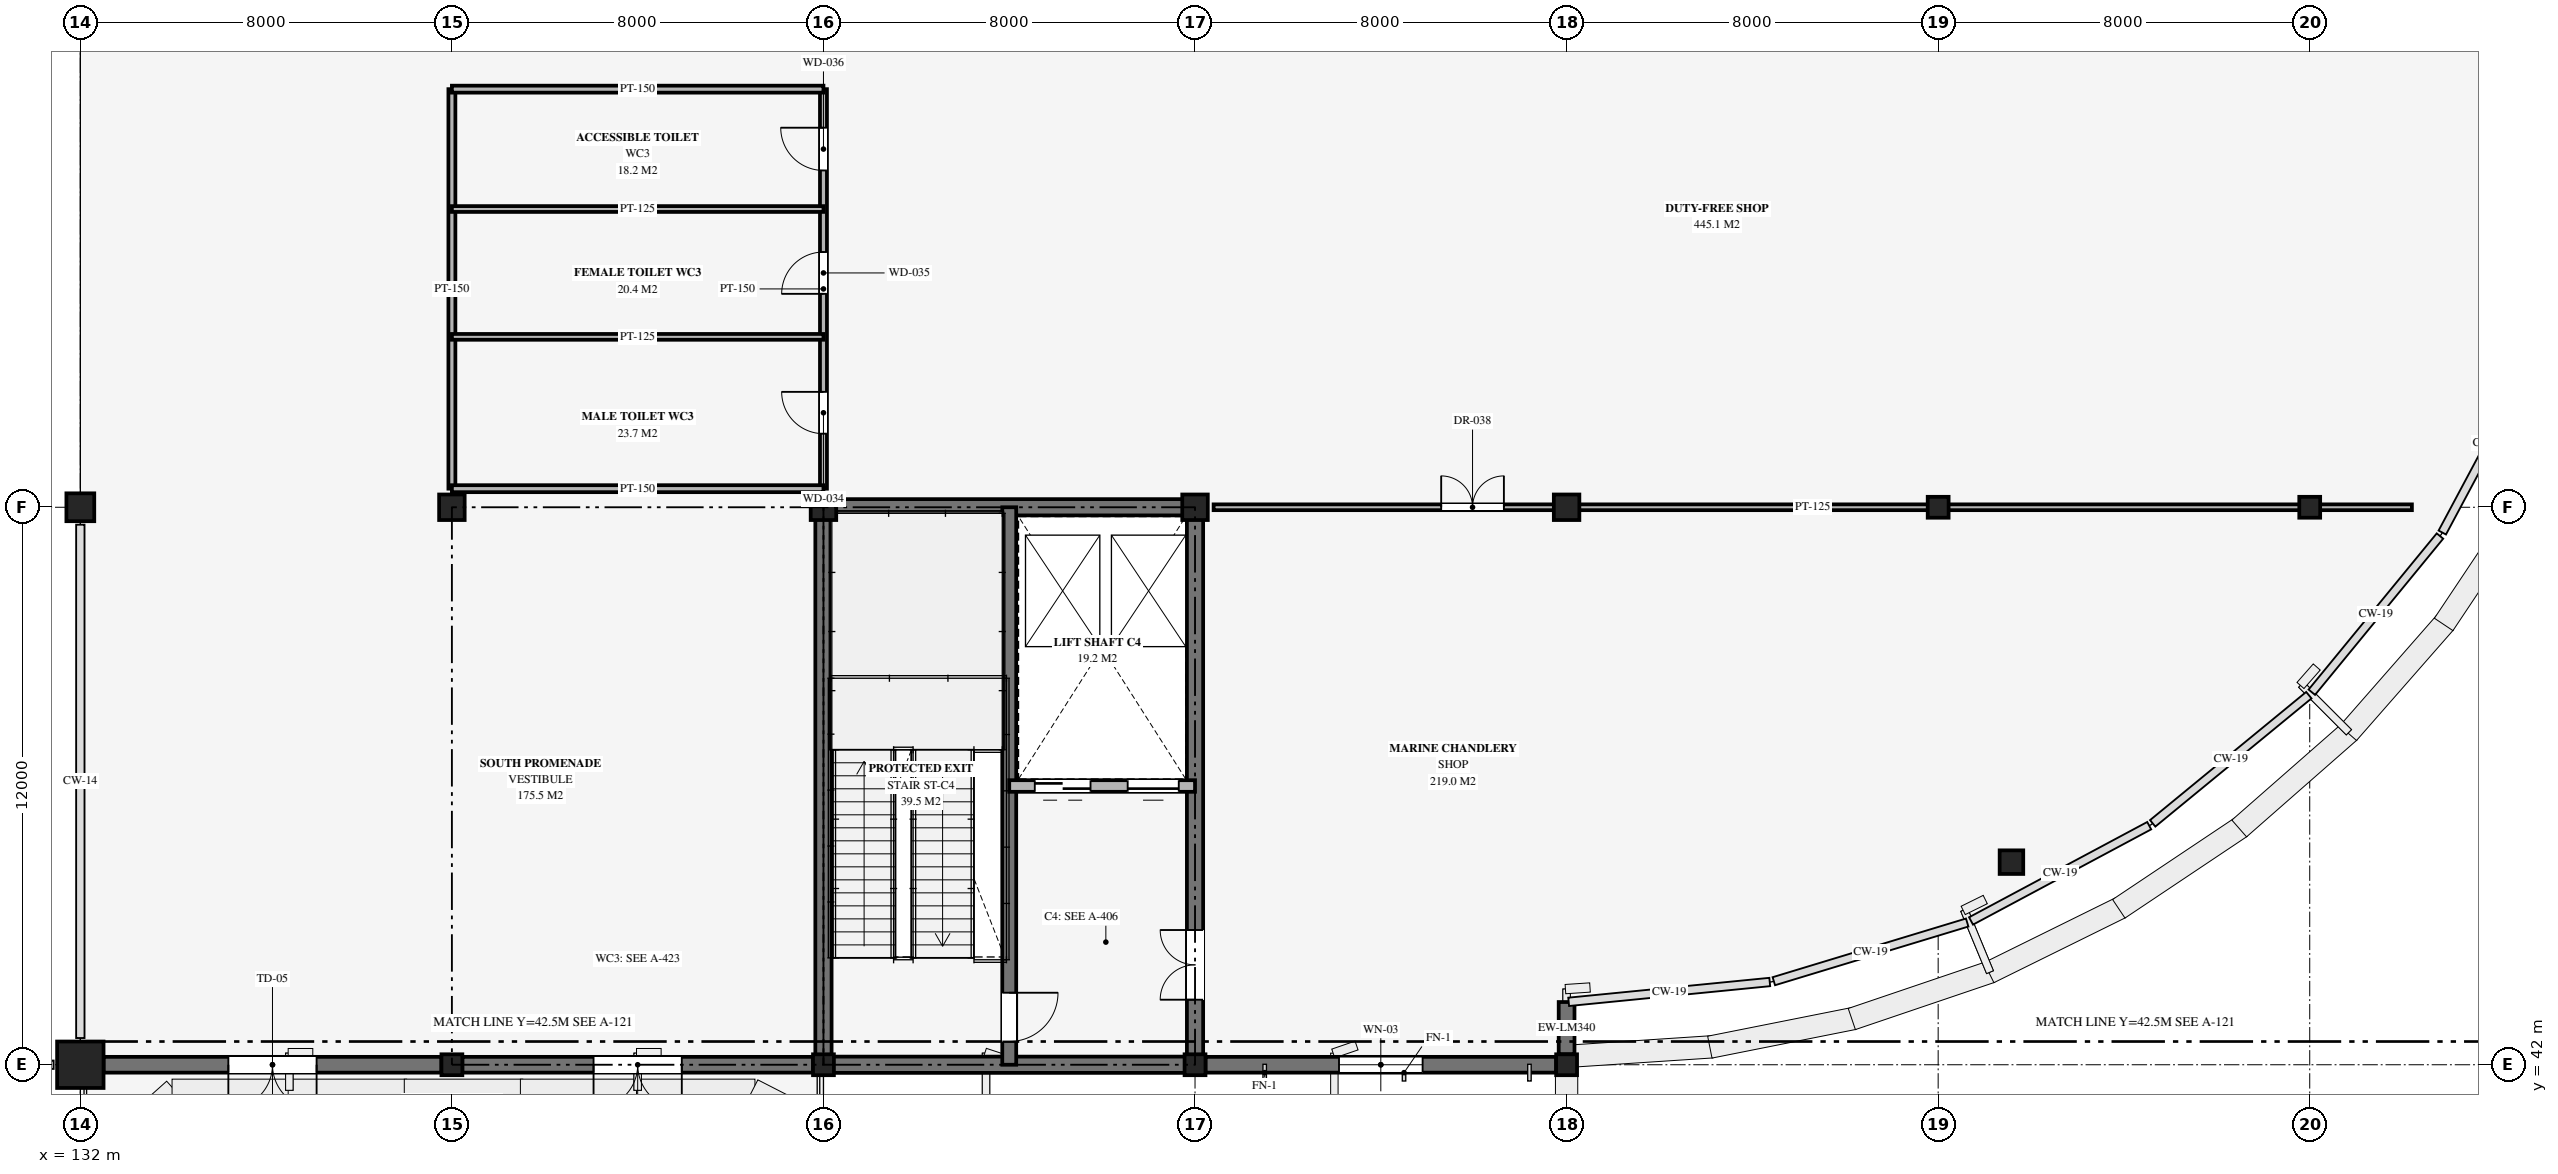
"""IFC4 building model, lengths in metres.
Left out: names, types, materials, properties, quantities, classifications, styles, units other than length and angle.
Written with IfcOpenShell. Run it as: python <this file> out.ifc"""

import sys

from ifc_helpers import new_model, si_unit, direction, frame, frame_2d, origin, origin_2d, place, context, subcontext, project, spatial, rectangle, circle, hollow_circle, extrude, element, fill, save


model = new_model("IFC4")
c1 = context("Model", 3, precision=1e-05, world=origin(), true_north=direction((0.0, 1.0)))
c2 = subcontext(c1, "Body", "Model", "MODEL_VIEW")
j1 = project(units=[si_unit("LENGTHUNIT", "METRE"), si_unit("PLANEANGLEUNIT", "RADIAN")], contexts=[c1])
p1 = place(None, origin())
s1 = spatial("IfcSite", under=j1, at=p1, CompositionType="ELEMENT")
p2 = place(p1, origin())
s2 = spatial("IfcBuilding", under=s1, at=p2, CompositionType="ELEMENT")
p3 = place(p2, frame((0.0, 0.0, 10.2)))
s3 = spatial("IfcBuildingStorey", under=s2, at=p3, CompositionType="ELEMENT", Elevation=10.2)
p4 = place(p3, frame((132.0, 42.0, 0.0), z_axis=(0.0, 0.0, 1.0), x_axis=(1.0, 0.0, 0.0)))
e1 = element("IfcColumn", 1, at=p4, inside=s3, PredefinedType="COLUMN", context=c2, shape_type="SweptSolid", body=[
    extrude(rectangle(XDim=1.0, YDim=1.0, at=origin_2d()), origin(), (0.0, 0.0, 1.0), 4.8),
])
p5 = place(p3, frame((132.0, 54.0, 0.0), z_axis=(0.0, 0.0, 1.0), x_axis=(1.0, 0.0, 0.0)))
e2 = element("IfcColumn", 2, at=p5, inside=s3, PredefinedType="COLUMN", context=c2, shape_type="SweptSolid", body=[
    extrude(circle(Radius=0.3, at=origin_2d()), origin(), (0.0, 0.0, 1.0), 4.64),
])
p6 = place(p3, frame((140.0, 42.0, 0.0), z_axis=(0.0, 0.0, 1.0), x_axis=(1.0, 0.0, 0.0)))
e3 = element("IfcColumn", 3, at=p6, inside=s3, PredefinedType="COLUMN", context=c2, shape_type="SweptSolid", body=[
    extrude(rectangle(XDim=0.45, YDim=0.45, at=origin_2d()), origin(), (0.0, 0.0, 1.0), 4.64),
])
p7 = place(p3, frame((140.0, 54.0, 0.0), z_axis=(0.0, 0.0, 1.0), x_axis=(1.0, 0.0, 0.0)))
e4 = element("IfcColumn", 4, at=p7, inside=s3, PredefinedType="COLUMN", context=c2, shape_type="SweptSolid", body=[
    extrude(rectangle(XDim=0.55, YDim=0.55, at=origin_2d()), origin(), (0.0, 0.0, 1.0), 4.64),
])
p8 = place(p3, frame((148.0, 42.0, 0.0), z_axis=(0.0, 0.0, 1.0), x_axis=(1.0, 0.0, 0.0)))
e5 = element("IfcColumn", 5, at=p8, inside=s3, PredefinedType="COLUMN", context=c2, shape_type="SweptSolid", body=[
    extrude(rectangle(XDim=0.45, YDim=0.45, at=origin_2d()), origin(), (0.0, 0.0, 1.0), 4.64),
])
p9 = place(p3, frame((148.0, 54.0, 0.0), z_axis=(0.0, 0.0, 1.0), x_axis=(1.0, 0.0, 0.0)))
e6 = element("IfcColumn", 6, at=p9, inside=s3, PredefinedType="COLUMN", context=c2, shape_type="SweptSolid", body=[
    extrude(rectangle(XDim=0.55, YDim=0.55, at=origin_2d()), origin(), (0.0, 0.0, 1.0), 4.64),
])
p10 = place(p3, frame((156.0, 42.0, 0.0), z_axis=(0.0, 0.0, 1.0), x_axis=(1.0, 0.0, 0.0)))
e7 = element("IfcColumn", 7, at=p10, inside=s3, PredefinedType="COLUMN", context=c2, shape_type="SweptSolid", body=[
    extrude(rectangle(XDim=0.45, YDim=0.45, at=origin_2d()), origin(), (0.0, 0.0, 1.0), 4.64),
])
p11 = place(p3, frame((156.0, 54.0, 0.0), z_axis=(0.0, 0.0, 1.0), x_axis=(1.0, 0.0, 0.0)))
e8 = element("IfcColumn", 8, at=p11, inside=s3, PredefinedType="COLUMN", context=c2, shape_type="SweptSolid", body=[
    extrude(rectangle(XDim=0.55, YDim=0.55, at=origin_2d()), origin(), (0.0, 0.0, 1.0), 4.64),
])
p12 = place(p3, frame((164.0, 42.0, 0.0), z_axis=(0.0, 0.0, 1.0), x_axis=(1.0, 0.0, 0.0)))
e9 = element("IfcColumn", 9, at=p12, inside=s3, PredefinedType="COLUMN", context=c2, shape_type="SweptSolid", body=[
    extrude(rectangle(XDim=0.45, YDim=0.45, at=origin_2d()), origin(), (0.0, 0.0, 1.0), 4.64),
])
p13 = place(p3, frame((164.0, 54.0, 0.0), z_axis=(0.0, 0.0, 1.0), x_axis=(1.0, 0.0, 0.0)))
e10 = element("IfcColumn", 10, at=p13, inside=s3, PredefinedType="COLUMN", context=c2, shape_type="SweptSolid", body=[
    extrude(rectangle(XDim=0.55, YDim=0.55, at=origin_2d()), origin(), (0.0, 0.0, 1.0), 4.64),
])
for number, where, z_axis, x_axis in (
    (11, (172.0, 54.0, 0.0), (0.0, 0.0, 1.0), (1.0, 0.0, 0.0)),
    (12, (180.0, 54.0, 0.0), (0.0, 0.0, 1.0), (1.0, 0.0, 0.0)),
):
    element("IfcColumn", number, at=place(p3, frame(where, z_axis=z_axis, x_axis=x_axis)), inside=s3, PredefinedType="COLUMN", context=c2, shape_type="SweptSolid", body=[
        extrude(rectangle(XDim=0.45, YDim=0.45, at=origin_2d()), origin(), (0.0, 0.0, 1.0), 4.64),
    ])
p14 = place(p3, frame((173.578, 46.361, 0.0), z_axis=(0.0, 0.0, 1.0), x_axis=(1.0, 0.0, 0.0)))
e13 = element("IfcColumn", 13, at=p14, inside=s3, PredefinedType="COLUMN", context=c2, shape_type="SweptSolid", body=[
    extrude(hollow_circle(Radius=0.254, WallThickness=0.02, at=origin_2d()), origin(), (0.0, 0.0, 1.0), 4.64),
])
p15 = place(p3, frame((164.0, 42.225, 0.0), z_axis=(0.0, 0.0, 1.0), x_axis=(0.0, 1.0, 0.0)))
e14 = element("IfcWall", 14, at=p15, inside=s3, PredefinedType="SOLIDWALL", context=c2, shape_type="SweptSolid", body=[
    extrude(rectangle(XDim=1.125, YDim=0.34, at=frame_2d((0.562, 0.0))), origin(), (0.0, 0.0, 1.0), 4.52),
])
p16 = place(p3, frame((139.775, 42.0, 0.0), z_axis=(0.0, 0.0, 1.0), x_axis=(-1.0, 0.0, 0.0)))
e15 = element("IfcWall", 15, at=p16, inside=s3, PredefinedType="SOLIDWALL", context=c2, shape_type="SweptSolid", body=[
    extrude(rectangle(XDim=7.275, YDim=0.34, at=frame_2d((3.637, 0.0))), origin(), (0.0, 0.0, 1.0), 4.52),
])
p17 = place(p16, frame((2.688, 0.0, 0.0)))
e16 = element("IfcOpeningElement", 16, at=p17, cuts=e15, PredefinedType="OPENING", context=c2, shape_type="SweptSolid", body=[
    extrude(rectangle(XDim=1.9, YDim=2.2, at=frame_2d((0.95, 1.1))), frame((0.0, 0.18, 0.0), z_axis=(0.0, -1.0, 0.0), x_axis=(1.0, 0.0, 0.0)), (0.0, 0.0, 1.0), 0.36),
])
p18 = place(p3, frame((147.775, 42.0, 0.0), z_axis=(0.0, 0.0, 1.0), x_axis=(-1.0, 0.0, 0.0)))
e17 = element("IfcWall", 17, at=p18, inside=s3, PredefinedType="SOLIDWALL", context=c2, shape_type="SweptSolid", body=[
    extrude(rectangle(XDim=7.55, YDim=0.34, at=frame_2d((3.775, 0.0))), origin(), (0.0, 0.0, 1.0), 4.52),
])
p19 = place(p18, frame((2.825, 0.0, 0.0)))
e18 = element("IfcOpeningElement", 18, at=p19, cuts=e17, PredefinedType="OPENING", context=c2, shape_type="SweptSolid", body=[
    extrude(rectangle(XDim=1.9, YDim=2.2, at=frame_2d((0.95, 1.1))), frame((0.0, 0.18, 0.0), z_axis=(0.0, -1.0, 0.0), x_axis=(1.0, 0.0, 0.0)), (0.0, 0.0, 1.0), 0.36),
])
p20 = place(p3, frame((163.775, 42.0, 0.0), z_axis=(0.0, 0.0, 1.0), x_axis=(-1.0, 0.0, 0.0)))
e19 = element("IfcWall", 19, at=p20, inside=s3, PredefinedType="SOLIDWALL", context=c2, shape_type="SweptSolid", body=[
    extrude(rectangle(XDim=7.55, YDim=0.34, at=frame_2d((3.775, 0.0))), origin(), (0.0, 0.0, 1.0), 4.52),
])
p21 = place(p20, frame((2.875, 0.0, 1.0)))
e20 = element("IfcOpeningElement", 20, at=p21, cuts=e19, PredefinedType="OPENING", context=c2, shape_type="SweptSolid", body=[
    extrude(rectangle(XDim=1.8, YDim=2.2, at=frame_2d((0.9, 1.1))), frame((0.0, 0.18, 0.0), z_axis=(0.0, -1.0, 0.0), x_axis=(1.0, 0.0, 0.0)), (0.0, 0.0, 1.0), 0.36),
])
for number, where, z_axis, x_axis in (
    (21, (148.0, 42.0, 0.0), (0.0, 0.0, 1.0), (1.0, 0.0, 0.0)),
    (22, (148.0, 54.0, 0.0), (0.0, 0.0, 1.0), (1.0, 0.0, 0.0)),
):
    element("IfcWall", number, at=place(p3, frame(where, z_axis=z_axis, x_axis=x_axis)), inside=s3, PredefinedType="SHEAR", context=c2, shape_type="SweptSolid", body=[
        extrude(rectangle(XDim=8.0, YDim=0.35, at=frame_2d((4.0, 0.0))), origin(), (0.0, 0.0, 1.0), 4.78),
    ])
p22 = place(p3, frame((148.0, 42.0, 0.0), z_axis=(0.0, 0.0, 1.0), x_axis=(0.0, 1.0, 0.0)))
e23 = element("IfcWall", 23, at=p22, inside=s3, PredefinedType="SHEAR", context=c2, shape_type="SweptSolid", body=[
    extrude(rectangle(XDim=12.0, YDim=0.35, at=frame_2d((6.0, 0.0))), origin(), (0.0, 0.0, 1.0), 4.78),
])
p23 = place(p3, frame((156.0, 42.0, 0.0), z_axis=(0.0, 0.0, 1.0), x_axis=(0.0, 1.0, 0.0)))
e24 = element("IfcWall", 24, at=p23, inside=s3, PredefinedType="SHEAR", context=c2, shape_type="SweptSolid", body=[
    extrude(rectangle(XDim=12.0, YDim=0.35, at=frame_2d((6.0, 0.0))), origin(), (0.0, 0.0, 1.0), 4.78),
])
p24 = place(p23, frame((1.4, 0.0, 0.0)))
e25 = element("IfcOpeningElement", 25, at=p24, cuts=e24, PredefinedType="OPENING", context=c2, shape_type="SweptSolid", body=[
    extrude(rectangle(XDim=1.5, YDim=2.2, at=frame_2d((0.75, 1.1))), frame((0.0, 0.185, 0.0), z_axis=(0.0, -1.0, 0.0), x_axis=(1.0, 0.0, 0.0)), (0.0, 0.0, 1.0), 0.37),
])
p25 = place(p3, frame((152.0, 54.0, 0.0), z_axis=(0.0, 0.0, 1.0), x_axis=(0.0, -1.0, 0.0)))
e26 = element("IfcWall", 26, at=p25, inside=s3, PredefinedType="SHEAR", context=c2, shape_type="SweptSolid", body=[
    extrude(rectangle(XDim=12.0, YDim=0.3, at=frame_2d((6.0, 0.0))), origin(), (0.0, 0.0, 1.0), 4.78),
])
p26 = place(p25, frame((10.45, 0.0, 0.0)))
e27 = element("IfcOpeningElement", 27, at=p26, cuts=e26, PredefinedType="OPENING", context=c2, shape_type="SweptSolid", body=[
    extrude(rectangle(XDim=1.05, YDim=2.15, at=frame_2d((0.525, 1.075))), frame((0.0, 0.16, 0.0), z_axis=(0.0, -1.0, 0.0), x_axis=(1.0, 0.0, 0.0)), (0.0, 0.0, 1.0), 0.32),
])
p27 = place(p3, frame((156.0, 48.0, 0.0), z_axis=(0.0, 0.0, 1.0), x_axis=(-1.0, 0.0, 0.0)))
e28 = element("IfcWall", 28, at=p27, inside=s3, PredefinedType="SOLIDWALL", context=c2, shape_type="SweptSolid", body=[
    extrude(rectangle(XDim=4.0, YDim=0.25, at=frame_2d((2.0, 0.0))), origin(), (0.0, 0.0, 1.0), 3.65),
])
p28 = place(p27, frame((0.35, 0.0, 0.0)))
e29 = element("IfcOpeningElement", 29, at=p28, cuts=e28, PredefinedType="OPENING", context=c2, shape_type="SweptSolid", body=[
    extrude(rectangle(XDim=1.1, YDim=2.2, at=frame_2d((0.55, 1.1))), frame((0.0, 0.135, 0.0), z_axis=(0.0, -1.0, 0.0), x_axis=(1.0, 0.0, 0.0)), (0.0, 0.0, 1.0), 0.27),
])
p29 = place(p27, frame((2.25, 0.0, 0.0)))
e30 = element("IfcOpeningElement", 30, at=p29, cuts=e28, PredefinedType="OPENING", context=c2, shape_type="SweptSolid", body=[
    extrude(rectangle(XDim=1.2, YDim=2.2, at=frame_2d((0.6, 1.1))), frame((0.0, 0.135, 0.0), z_axis=(0.0, -1.0, 0.0), x_axis=(1.0, 0.0, 0.0)), (0.0, 0.0, 1.0), 0.27),
])
p30 = place(p3, frame((140.0, 54.4, 0.0), z_axis=(0.0, 0.0, 1.0), x_axis=(0.0, 1.0, 0.0)))
e31 = element("IfcWall", 31, at=p30, inside=s3, PredefinedType="PARTITIONING", context=c2, shape_type="SweptSolid", body=[
    extrude(rectangle(XDim=8.6, YDim=0.15, at=frame_2d((4.3, 0.0))), origin(), (0.0, 0.0, 1.0), 3.65),
])
p31 = place(p3, frame((148.0, 54.4, 0.0), z_axis=(0.0, 0.0, 1.0), x_axis=(0.0, 1.0, 0.0)))
e32 = element("IfcWall", 32, at=p31, inside=s3, PredefinedType="PARTITIONING", context=c2, shape_type="SweptSolid", body=[
    extrude(rectangle(XDim=8.6, YDim=0.15, at=frame_2d((4.3, 0.0))), origin(), (0.0, 0.0, 1.0), 3.65),
])
p32 = place(p31, frame((1.184, 0.0, 0.0)))
e33 = element("IfcOpeningElement", 33, at=p32, cuts=e32, PredefinedType="OPENING", context=c2, shape_type="SweptSolid", body=[
    extrude(rectangle(XDim=0.9, YDim=2.1, at=frame_2d((0.45, 1.05))), frame((0.0, 0.085, 0.0), z_axis=(0.0, -1.0, 0.0), x_axis=(1.0, 0.0, 0.0)), (0.0, 0.0, 1.0), 0.17),
])
p33 = place(p31, frame((4.194, 0.0, 0.0)))
e34 = element("IfcOpeningElement", 34, at=p33, cuts=e32, PredefinedType="OPENING", context=c2, shape_type="SweptSolid", body=[
    extrude(rectangle(XDim=0.9, YDim=2.1, at=frame_2d((0.45, 1.05))), frame((0.0, 0.085, 0.0), z_axis=(0.0, -1.0, 0.0), x_axis=(1.0, 0.0, 0.0)), (0.0, 0.0, 1.0), 0.17),
])
p34 = place(p31, frame((6.85, 0.0, 0.0)))
e35 = element("IfcOpeningElement", 35, at=p34, cuts=e32, PredefinedType="OPENING", context=c2, shape_type="SweptSolid", body=[
    extrude(rectangle(XDim=0.92, YDim=2.1, at=frame_2d((0.46, 1.05))), frame((0.0, 0.085, 0.0), z_axis=(0.0, -1.0, 0.0), x_axis=(1.0, 0.0, 0.0)), (0.0, 0.0, 1.0), 0.17),
])
for number, where, z_axis, x_axis in (
    (36, (140.0, 63.0, 0.0), (0.0, 0.0, 1.0), (1.0, 0.0, 0.0)),
    (37, (140.0, 54.4, 0.0), (0.0, 0.0, 1.0), (1.0, 0.0, 0.0)),
):
    element("IfcWall", number, at=place(p3, frame(where, z_axis=z_axis, x_axis=x_axis)), inside=s3, PredefinedType="PARTITIONING", context=c2, shape_type="SweptSolid", body=[
        extrude(rectangle(XDim=8.0, YDim=0.15, at=frame_2d((4.0, 0.0))), origin(), (0.0, 0.0, 1.0), 3.65),
    ])
for number, where, z_axis, x_axis in (
    (38, (140.0, 57.668, 0.0), (0.0, 0.0, 1.0), (1.0, 0.0, 0.0)),
    (39, (140.0, 60.42, 0.0), (0.0, 0.0, 1.0), (1.0, 0.0, 0.0)),
):
    element("IfcWall", number, at=place(p3, frame(where, z_axis=z_axis, x_axis=x_axis)), inside=s3, PredefinedType="PARTITIONING", context=c2, shape_type="SweptSolid", body=[
        extrude(rectangle(XDim=8.0, YDim=0.125, at=frame_2d((4.0, 0.0))), origin(), (0.0, 0.0, 1.0), 3.65),
    ])
p35 = place(p3, frame((156.4, 54.0, 0.0), z_axis=(0.0, 0.0, 1.0), x_axis=(1.0, 0.0, 0.0)))
e40 = element("IfcWall", 40, at=p35, inside=s3, PredefinedType="PARTITIONING", context=c2, shape_type="SweptSolid", body=[
    extrude(rectangle(XDim=25.8, YDim=0.125, at=frame_2d((12.9, 0.0))), origin(), (0.0, 0.0, 1.0), 3.65),
])
p36 = place(p35, frame((4.9, 0.0, 0.0)))
e41 = element("IfcOpeningElement", 41, at=p36, cuts=e40, PredefinedType="OPENING", context=c2, shape_type="SweptSolid", body=[
    extrude(rectangle(XDim=1.35, YDim=2.15, at=frame_2d((0.675, 1.075))), frame((0.0, 0.073, 0.0), z_axis=(0.0, -1.0, 0.0), x_axis=(1.0, 0.0, 0.0)), (0.0, 0.0, 1.0), 0.145),
])
p37 = place(p17, origin())
e42 = element("IfcDoor", 42, at=p37, inside=s3, OperationType="DOUBLE_DOOR_SINGLE_SWING", PredefinedType="DOOR", context=c2, shape_type="SweptSolid", body=[
    extrude(rectangle(XDim=1.9, YDim=2.2, at=frame_2d((0.95, 1.1))), frame((0.0, 0.025, 0.0), z_axis=(0.0, -1.0, 0.0), x_axis=(1.0, 0.0, 0.0)), (0.0, 0.0, 1.0), 0.05),
])
fill(e16, e42)
p38 = place(p19, origin())
e43 = element("IfcDoor", 43, at=p38, inside=s3, OperationType="DOUBLE_DOOR_SINGLE_SWING", PredefinedType="DOOR", context=c2, shape_type="SweptSolid", body=[
    extrude(rectangle(XDim=1.9, YDim=2.2, at=frame_2d((0.95, 1.1))), frame((0.0, 0.025, 0.0), z_axis=(0.0, -1.0, 0.0), x_axis=(1.0, 0.0, 0.0)), (0.0, 0.0, 1.0), 0.05),
])
fill(e18, e43)
p39 = place(p21, origin())
e44 = element("IfcWindow", 44, at=p39, inside=s3, PartitioningType="SINGLE_PANEL", PredefinedType="WINDOW", context=c2, shape_type="SweptSolid", body=[
    extrude(rectangle(XDim=1.8, YDim=2.2, at=frame_2d((0.9, 1.1))), frame((0.0, 0.03, 0.0), z_axis=(0.0, -1.0, 0.0), x_axis=(1.0, 0.0, 0.0)), (0.0, 0.0, 1.0), 0.06),
])
fill(e20, e44)
p40 = place(p28, origin())
e45 = element("IfcDoor", 45, at=p40, inside=s3, OperationType="SLIDING_TO_LEFT", PredefinedType="USERDEFINED", context=c2, shape_type="SweptSolid", body=[
    extrude(rectangle(XDim=1.1, YDim=2.2, at=frame_2d((0.55, 1.1))), frame((0.0, 0.025, 0.0), z_axis=(0.0, -1.0, 0.0), x_axis=(1.0, 0.0, 0.0)), (0.0, 0.0, 1.0), 0.05),
])
fill(e29, e45)
p41 = place(p29, origin())
e46 = element("IfcDoor", 46, at=p41, inside=s3, OperationType="DOUBLE_DOOR_SLIDING", PredefinedType="USERDEFINED", context=c2, shape_type="SweptSolid", body=[
    extrude(rectangle(XDim=1.2, YDim=2.2, at=frame_2d((0.6, 1.1))), frame((0.0, 0.025, 0.0), z_axis=(0.0, -1.0, 0.0), x_axis=(1.0, 0.0, 0.0)), (0.0, 0.0, 1.0), 0.05),
])
fill(e30, e46)
p42 = place(p26, origin())
e47 = element("IfcDoor", 47, at=p42, inside=s3, OperationType="SINGLE_SWING_LEFT", PredefinedType="DOOR", context=c2, shape_type="SweptSolid", body=[
    extrude(rectangle(XDim=1.05, YDim=2.15, at=frame_2d((0.525, 1.075))), frame((0.0, 0.025, 0.0), z_axis=(0.0, -1.0, 0.0), x_axis=(1.0, 0.0, 0.0)), (0.0, 0.0, 1.0), 0.05),
])
fill(e27, e47)
p43 = place(p24, origin())
e48 = element("IfcDoor", 48, at=p43, inside=s3, OperationType="DOUBLE_DOOR_SINGLE_SWING", PredefinedType="DOOR", context=c2, shape_type="SweptSolid", body=[
    extrude(rectangle(XDim=1.5, YDim=2.2, at=frame_2d((0.75, 1.1))), frame((0.0, 0.025, 0.0), z_axis=(0.0, -1.0, 0.0), x_axis=(1.0, 0.0, 0.0)), (0.0, 0.0, 1.0), 0.05),
])
fill(e25, e48)
p44 = place(p32, origin())
e49 = element("IfcDoor", 49, at=p44, inside=s3, OperationType="SINGLE_SWING_RIGHT", PredefinedType="DOOR", context=c2, shape_type="SweptSolid", body=[
    extrude(rectangle(XDim=0.9, YDim=2.1, at=frame_2d((0.45, 1.05))), frame((0.0, 0.025, 0.0), z_axis=(0.0, -1.0, 0.0), x_axis=(1.0, 0.0, 0.0)), (0.0, 0.0, 1.0), 0.05),
])
fill(e33, e49)
p45 = place(p33, origin())
e50 = element("IfcDoor", 50, at=p45, inside=s3, OperationType="SINGLE_SWING_LEFT", PredefinedType="DOOR", context=c2, shape_type="SweptSolid", body=[
    extrude(rectangle(XDim=0.9, YDim=2.1, at=frame_2d((0.45, 1.05))), frame((0.0, 0.025, 0.0), z_axis=(0.0, -1.0, 0.0), x_axis=(1.0, 0.0, 0.0)), (0.0, 0.0, 1.0), 0.05),
])
fill(e34, e50)
p46 = place(p34, origin())
e51 = element("IfcDoor", 51, at=p46, inside=s3, OperationType="SINGLE_SWING_RIGHT", PredefinedType="DOOR", context=c2, shape_type="SweptSolid", body=[
    extrude(rectangle(XDim=0.92, YDim=2.1, at=frame_2d((0.46, 1.05))), frame((0.0, 0.025, 0.0), z_axis=(0.0, -1.0, 0.0), x_axis=(1.0, 0.0, 0.0)), (0.0, 0.0, 1.0), 0.05),
])
fill(e35, e51)
p47 = place(p36, origin())
e52 = element("IfcDoor", 52, at=p47, inside=s3, OperationType="DOUBLE_DOOR_SINGLE_SWING", PredefinedType="DOOR", context=c2, shape_type="SweptSolid", body=[
    extrude(rectangle(XDim=1.35, YDim=2.15, at=frame_2d((0.675, 1.075))), frame((0.0, 0.025, 0.0), z_axis=(0.0, -1.0, 0.0), x_axis=(1.0, 0.0, 0.0)), (0.0, 0.0, 1.0), 0.05),
])
fill(e41, e52)
save(model, sys.argv[1])
